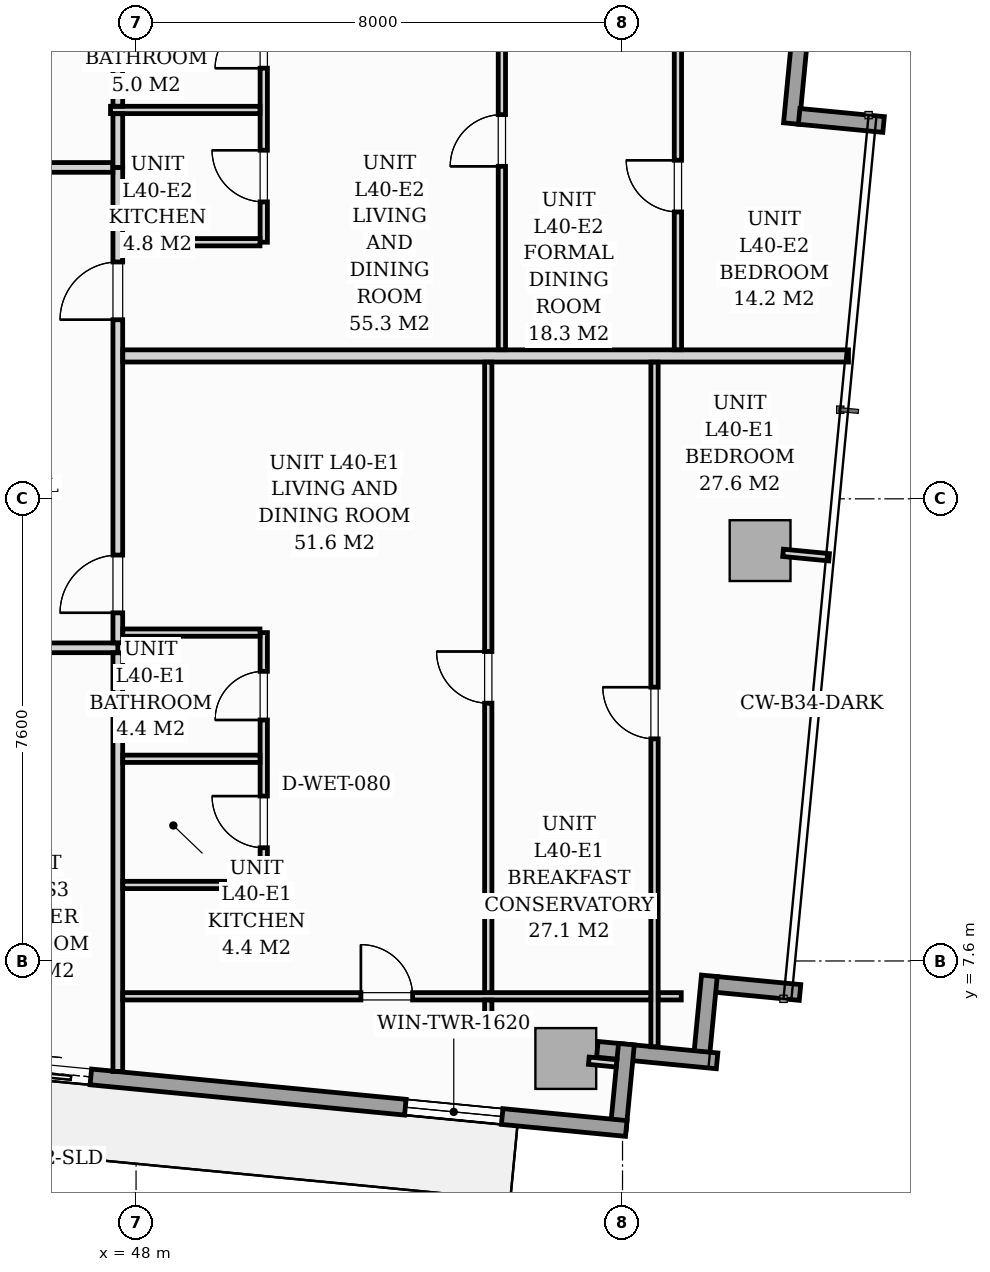
"""IFC4 building model, lengths in metres.
Left out: names, types, materials, properties, quantities, classifications, styles, units other than length and angle.
Written with IfcOpenShell. Run it as: python <this file> out.ifc"""

import sys

from ifc_helpers import new_model, si_unit, direction, frame, frame_2d, origin, origin_2d, place, context, subcontext, project, spatial, rectangle, extrude, source, transform, mapped, element, fill, save


model = new_model("IFC4")
c1 = context("Model", 3, precision=1e-05, world=origin(), true_north=direction((0.0, 1.0)))
c2 = subcontext(c1, "Body", "Model", "MODEL_VIEW")
j1 = project(units=[si_unit("LENGTHUNIT", "METRE"), si_unit("PLANEANGLEUNIT", "RADIAN")], contexts=[c1])
p1 = place(None, origin())
s1 = spatial("IfcSite", under=j1, at=p1, CompositionType="ELEMENT")
p2 = place(p1, origin())
s2 = spatial("IfcBuilding", under=s1, at=p2, CompositionType="ELEMENT")
p3 = place(p2, frame((0.0, 0.0, 140.6)))
s3 = spatial("IfcBuildingStorey", under=s2, at=p3, CompositionType="ELEMENT", Elevation=140.6)
m1 = source(origin(), c2, "Body", "SweptSolid", [
    extrude(rectangle(XDim=1.0, YDim=1.0, at=origin_2d()), origin(), (0.0, 0.0, 1.0), 3.196),
])
for number, where, z_axis, x_axis in (
    (1, (55.067, 5.996, 0.002), (0.0, 0.0, 1.0), (0.995, -0.096, 0.0)),
    (2, (58.262, 14.348, 0.002), (0.0, 0.0, 1.0), (0.995, -0.096, 0.0)),
):
    element("IfcColumn", number, at=place(p3, frame(where, z_axis=z_axis, x_axis=x_axis)), inside=s3, PredefinedType="COLUMN", context=c2, shape_type="MappedRepresentation", body=[
        mapped(m1, transform((0.0, 0.0, 0.0), scale=1.0)),
    ])
for number, where, z_axis, x_axis in (
    (3, (58.912, 22.76, 0.0), (0.0, 0.0, 1.0), (-0.096, -0.995, 0.0)),
    (4, (58.905, 21.49, 0.0), (0.0, 0.0, 1.0), (0.995, -0.096, 0.0)),
):
    element("IfcWall", number, at=place(p3, frame(where, z_axis=z_axis, x_axis=x_axis)), inside=s3, PredefinedType="STANDARD", context=c2, shape_type="SweptSolid", body=[
        extrude(rectangle(XDim=1.395, YDim=0.26, at=frame_2d((0.698, 0.0))), origin(), (0.0, 0.0, 1.0), 2.94),
    ])
for number, where, z_axis, x_axis in (
    (5, (58.919, 7.082, 0.0), (0.0, 0.0, 1.0), (-0.995, 0.096, 0.0)),
    (6, (57.428, 7.356, 0.0), (0.0, 0.0, 1.0), (-0.096, -0.995, 0.0)),
):
    element("IfcWall", number, at=place(p3, frame(where, z_axis=z_axis, x_axis=x_axis)), inside=s3, PredefinedType="STANDARD", context=c2, shape_type="SweptSolid", body=[
        extrude(rectangle(XDim=1.395, YDim=0.26, at=frame_2d((0.697, 0.0))), origin(), (0.0, 0.0, 1.0), 2.94),
    ])
p4 = place(p3, frame((57.555, 5.958, 0.0), z_axis=(0.0, 0.0, 1.0), x_axis=(-0.995401789159, 0.095787672171, 0.0)))
e7 = element("IfcWall", 7, at=p4, inside=s3, PredefinedType="STANDARD", context=c2, shape_type="SweptSolid", body=[
    extrude(rectangle(XDim=1.978, YDim=0.26, at=frame_2d((0.989, 0.0))), origin(), (0.0, 0.0, 1.0), 2.94),
])
p5 = place(p3, frame((56.064, 6.232, 0.0), z_axis=(0.0, 0.0, 1.0), x_axis=(-0.09589913835, -0.995391056452, 0.0)))
e8 = element("IfcWall", 8, at=p5, inside=s3, PredefinedType="STANDARD", context=c2, shape_type="SweptSolid", body=[
    extrude(rectangle(XDim=1.395, YDim=0.26, at=frame_2d((0.698, 0.0))), origin(), (0.0, 0.0, 1.0), 2.94),
])
p6 = place(p3, frame((56.061, 4.845, 0.0), z_axis=(0.0, 0.0, 1.0), x_axis=(-0.995395976631, 0.095848055311, 0.0)))
e9 = element("IfcWall", 9, at=p6, inside=s3, PredefinedType="STANDARD", context=c2, shape_type="SweptSolid", body=[
    extrude(rectangle(XDim=17.01, YDim=0.26, at=frame_2d((8.505, 0.0))), origin(), (0.0, 0.0, 1.0), 2.94),
])
p7 = place(p6, frame((8.846, 0.0, 0.0)))
e10 = element("IfcOpeningElement", 10, at=p7, cuts=e9, PredefinedType="OPENING", context=c2, shape_type="SweptSolid", body=[
    extrude(rectangle(XDim=1.8, YDim=2.06, at=frame_2d((0.9, 1.03))), frame((0.0, 0.14, 0.0), z_axis=(0.0, -1.0, 0.0), x_axis=(1.0, 0.0, 0.0)), (0.0, 0.0, 1.0), 0.28),
])
p8 = place(p6, frame((2.05, 0.0, 0.65)))
e11 = element("IfcOpeningElement", 11, at=p8, cuts=e9, PredefinedType="OPENING", context=c2, shape_type="SweptSolid", body=[
    extrude(rectangle(XDim=1.6, YDim=1.5, at=frame_2d((0.8, 0.75))), frame((0.0, 0.14, 0.0), z_axis=(0.0, -1.0, 0.0), x_axis=(1.0, 0.0, 0.0)), (0.0, 0.0, 1.0), 0.28),
])
p9 = place(p3, frame((22.05, 12.75, 0.0), z_axis=(0.0, 0.0, 1.0), x_axis=(1.0, 0.0, 0.0)))
e12 = element("IfcWall", 12, at=p9, inside=s3, PredefinedType="PARTITIONING", context=c2, shape_type="SweptSolid", body=[
    extrude(rectangle(XDim=25.65, YDim=0.16, at=frame_2d((12.825, 0.0))), origin(), (0.0, 0.0, 1.0), 2.94),
])
p10 = place(p9, frame((1.312, 0.0, 0.0)))
e13 = element("IfcOpeningElement", 13, at=p10, cuts=e12, PredefinedType="OPENING", context=c2, shape_type="SweptSolid", body=[
    extrude(rectangle(XDim=0.95, YDim=2.06, at=frame_2d((0.475, 1.03))), frame((0.0, 0.09, 0.0), z_axis=(0.0, -1.0, 0.0), x_axis=(1.0, 0.0, 0.0)), (0.0, 0.0, 1.0), 0.18),
])
p11 = place(p9, frame((8.281, 0.0, 0.0)))
e14 = element("IfcOpeningElement", 14, at=p11, cuts=e12, PredefinedType="OPENING", context=c2, shape_type="SweptSolid", body=[
    extrude(rectangle(XDim=0.95, YDim=2.06, at=frame_2d((0.475, 1.03))), frame((0.0, 0.09, 0.0), z_axis=(0.0, -1.0, 0.0), x_axis=(1.0, 0.0, 0.0)), (0.0, 0.0, 1.0), 0.18),
])
p12 = place(p9, frame((17.268, 0.0, 0.0)))
e15 = element("IfcOpeningElement", 15, at=p12, cuts=e12, PredefinedType="OPENING", context=c2, shape_type="SweptSolid", body=[
    extrude(rectangle(XDim=0.95, YDim=2.06, at=frame_2d((0.475, 1.03))), frame((0.0, 0.09, 0.0), z_axis=(0.0, -1.0, 0.0), x_axis=(1.0, 0.0, 0.0)), (0.0, 0.0, 1.0), 0.18),
])
p13 = place(p3, frame((47.7, 5.783, 0.0), z_axis=(0.0, 0.0, 1.0), x_axis=(0.0, 1.0, 0.0)))
e16 = element("IfcWall", 16, at=p13, inside=s3, PredefinedType="PARTITIONING", context=c2, shape_type="SweptSolid", body=[
    extrude(rectangle(XDim=6.885, YDim=0.16, at=frame_2d((3.442, 0.0))), origin(), (0.0, 0.0, 1.0), 2.94),
])
p14 = place(p3, frame((47.7, 12.832, 0.0), z_axis=(0.0, 0.0, 1.0), x_axis=(0.0, 1.0, 0.0)))
e17 = element("IfcWall", 17, at=p14, inside=s3, PredefinedType="PARTITIONING", context=c2, shape_type="SweptSolid", body=[
    extrude(rectangle(XDim=7.818, YDim=0.16, at=frame_2d((3.909, 0.0))), origin(), (0.0, 0.0, 1.0), 2.94),
])
p15 = place(p14, frame((0.493, 0.0, 0.0)))
e18 = element("IfcOpeningElement", 18, at=p15, cuts=e17, PredefinedType="OPENING", context=c2, shape_type="SweptSolid", body=[
    extrude(rectangle(XDim=0.95, YDim=2.06, at=frame_2d((0.475, 1.03))), frame((0.0, 0.09, 0.0), z_axis=(0.0, -1.0, 0.0), x_axis=(1.0, 0.0, 0.0)), (0.0, 0.0, 1.0), 0.18),
])
p16 = place(p14, frame((5.313, 0.0, 0.0)))
e19 = element("IfcOpeningElement", 19, at=p16, cuts=e17, PredefinedType="OPENING", context=c2, shape_type="SweptSolid", body=[
    extrude(rectangle(XDim=0.95, YDim=2.06, at=frame_2d((0.475, 1.03))), frame((0.0, 0.09, 0.0), z_axis=(0.0, -1.0, 0.0), x_axis=(1.0, 0.0, 0.0)), (0.0, 0.0, 1.0), 0.18),
])
p17 = place(p3, frame((45.902, 20.65, 0.0), z_axis=(0.0, 0.0, 1.0), x_axis=(1.0, 0.0, 0.0)))
e20 = element("IfcWall", 20, at=p17, inside=s3, PredefinedType="PARTITIONING", context=c2, shape_type="SweptSolid", body=[
    extrude(rectangle(XDim=1.716, YDim=0.16, at=frame_2d((0.858, 0.0))), origin(), (0.0, 0.0, 1.0), 2.94),
])
p18 = place(p3, frame((47.782, 17.55, 0.0), z_axis=(0.0, 0.0, 1.0), x_axis=(1.0, 0.0, 0.0)))
e21 = element("IfcWall", 21, at=p18, inside=s3, PredefinedType="PARTITIONING", context=c2, shape_type="SweptSolid", body=[
    extrude(rectangle(XDim=11.934, YDim=0.2, at=frame_2d((5.967, 0.0))), origin(), (0.0, 0.0, 1.0), 2.94),
])
p19 = place(p3, frame((50.1, 8.85, 0.0), z_axis=(0.0, 0.0, 1.0), x_axis=(0.0, 1.0, 0.0)))
e22 = element("IfcWall", 22, at=p19, inside=s3, PredefinedType="PARTITIONING", context=c2, shape_type="SweptSolid", body=[
    extrude(rectangle(XDim=4.15, YDim=0.12, at=frame_2d((2.075, 0.0))), origin(), (0.0, 0.0, 1.0), 2.94),
])
p20 = place(p19, frame((0.612, 0.0, 0.0)))
e23 = element("IfcOpeningElement", 23, at=p20, cuts=e22, PredefinedType="OPENING", context=c2, shape_type="SweptSolid", body=[
    extrude(rectangle(XDim=0.85, YDim=2.05, at=frame_2d((0.425, 1.025))), frame((0.0, 0.07, 0.0), z_axis=(0.0, -1.0, 0.0), x_axis=(1.0, 0.0, 0.0)), (0.0, 0.0, 1.0), 0.14),
])
p21 = place(p19, frame((2.713, 0.0, 0.0)))
e24 = element("IfcOpeningElement", 24, at=p21, cuts=e22, PredefinedType="OPENING", context=c2, shape_type="SweptSolid", body=[
    extrude(rectangle(XDim=0.8, YDim=2.02, at=frame_2d((0.4, 1.01))), frame((0.0, 0.07, 0.0), z_axis=(0.0, -1.0, 0.0), x_axis=(1.0, 0.0, 0.0)), (0.0, 0.0, 1.0), 0.14),
])
for number, where, z_axis, x_axis in (
    (25, (47.782, 10.925, 0.0), (0.0, 0.0, 1.0), (1.0, 0.0, 0.0)),
    (26, (47.782, 8.85, 0.0), (0.0, 0.0, 1.0), (1.0, 0.0, 0.0)),
    (27, (47.782, 13.0, 0.0), (0.0, 0.0, 1.0), (1.0, 0.0, 0.0)),
):
    element("IfcWall", number, at=place(p3, frame(where, z_axis=z_axis, x_axis=x_axis)), inside=s3, PredefinedType="PARTITIONING", context=c2, shape_type="SweptSolid", body=[
        extrude(rectangle(XDim=2.256, YDim=0.12, at=frame_2d((1.128, 0.0))), origin(), (0.0, 0.0, 1.0), 2.94),
    ])
p22 = place(p3, frame((56.526, 6.189, 0.0), z_axis=(0.0, 0.0, 1.0), x_axis=(0.0, 1.0, 0.0)))
e28 = element("IfcWall", 28, at=p22, inside=s3, PredefinedType="PARTITIONING", context=c2, shape_type="SweptSolid", body=[
    extrude(rectangle(XDim=11.259, YDim=0.12, at=frame_2d((5.629, 0.0))), origin(), (0.0, 0.0, 1.0), 2.94),
])
p23 = place(p22, frame((5.064, 0.0, 0.0)))
e29 = element("IfcOpeningElement", 29, at=p23, cuts=e28, PredefinedType="OPENING", context=c2, shape_type="SweptSolid", body=[
    extrude(rectangle(XDim=0.85, YDim=2.05, at=frame_2d((0.425, 1.025))), frame((0.0, 0.07, 0.0), z_axis=(0.0, -1.0, 0.0), x_axis=(1.0, 0.0, 0.0)), (0.0, 0.0, 1.0), 0.14),
])
p24 = place(p3, frame((47.782, 7.019, 0.0), z_axis=(0.0, 0.0, 1.0), x_axis=(1.0, 0.0, 0.0)))
e30 = element("IfcWall", 30, at=p24, inside=s3, PredefinedType="PARTITIONING", context=c2, shape_type="SweptSolid", body=[
    extrude(rectangle(XDim=8.682, YDim=0.12, at=frame_2d((4.341, 0.0))), origin(), (0.0, 0.0, 1.0), 2.94),
])
p25 = place(p24, frame((3.916, 0.0, 0.0)))
e31 = element("IfcOpeningElement", 31, at=p25, cuts=e30, PredefinedType="OPENING", context=c2, shape_type="SweptSolid", body=[
    extrude(rectangle(XDim=0.85, YDim=2.05, at=frame_2d((0.425, 1.025))), frame((0.0, 0.07, 0.0), z_axis=(0.0, -1.0, 0.0), x_axis=(1.0, 0.0, 0.0)), (0.0, 0.0, 1.0), 0.14),
])
p26 = place(p3, frame((56.588, 7.019, 0.0), z_axis=(0.0, 0.0, 1.0), x_axis=(1.0, 0.0, 0.0)))
e32 = element("IfcWall", 32, at=p26, inside=s3, PredefinedType="PARTITIONING", context=c2, shape_type="SweptSolid", body=[
    extrude(rectangle(XDim=0.378, YDim=0.12, at=frame_2d((0.189, 0.0))), origin(), (0.0, 0.0, 1.0), 2.94),
])
p27 = place(p3, frame((53.792, 6.579, 0.0), z_axis=(0.0, 0.0, 1.0), x_axis=(0.0, 1.0, 0.0)))
e33 = element("IfcWall", 33, at=p27, inside=s3, PredefinedType="PARTITIONING", context=c2, shape_type="SweptSolid", body=[
    extrude(rectangle(XDim=0.378, YDim=0.12, at=frame_2d((0.189, 0.0))), origin(), (0.0, 0.0, 1.0), 2.94),
])
p28 = place(p3, frame((53.792, 7.081, 0.0), z_axis=(0.0, 0.0, 1.0), x_axis=(0.0, 1.0, 0.0)))
e34 = element("IfcWall", 34, at=p28, inside=s3, PredefinedType="PARTITIONING", context=c2, shape_type="SweptSolid", body=[
    extrude(rectangle(XDim=10.367, YDim=0.12, at=frame_2d((5.184, 0.0))), origin(), (0.0, 0.0, 1.0), 2.94),
])
p29 = place(p28, frame((4.758, 0.0, 0.0)))
e35 = element("IfcOpeningElement", 35, at=p29, cuts=e34, PredefinedType="OPENING", context=c2, shape_type="SweptSolid", body=[
    extrude(rectangle(XDim=0.85, YDim=2.05, at=frame_2d((0.425, 1.025))), frame((0.0, 0.07, 0.0), z_axis=(0.0, -1.0, 0.0), x_axis=(1.0, 0.0, 0.0)), (0.0, 0.0, 1.0), 0.14),
])
p30 = place(p3, frame((50.1, 19.42, 0.0), z_axis=(0.0, 0.0, 1.0), x_axis=(0.0, 1.0, 0.0)))
e36 = element("IfcWall", 36, at=p30, inside=s3, PredefinedType="PARTITIONING", context=c2, shape_type="SweptSolid", body=[
    extrude(rectangle(XDim=4.35, YDim=0.12, at=frame_2d((2.175, 0.0))), origin(), (0.0, 0.0, 1.0), 2.94),
])
p31 = place(p30, frame((0.663, 0.0, 0.0)))
e37 = element("IfcOpeningElement", 37, at=p31, cuts=e36, PredefinedType="OPENING", context=c2, shape_type="SweptSolid", body=[
    extrude(rectangle(XDim=0.85, YDim=2.05, at=frame_2d((0.425, 1.025))), frame((0.0, 0.07, 0.0), z_axis=(0.0, -1.0, 0.0), x_axis=(1.0, 0.0, 0.0)), (0.0, 0.0, 1.0), 0.14),
])
p32 = place(p30, frame((2.862, 0.0, 0.0)))
e38 = element("IfcOpeningElement", 38, at=p32, cuts=e36, PredefinedType="OPENING", context=c2, shape_type="SweptSolid", body=[
    extrude(rectangle(XDim=0.8, YDim=2.02, at=frame_2d((0.4, 1.01))), frame((0.0, 0.07, 0.0), z_axis=(0.0, -1.0, 0.0), x_axis=(1.0, 0.0, 0.0)), (0.0, 0.0, 1.0), 0.14),
])
p33 = place(p3, frame((47.58, 21.595, 0.0), z_axis=(0.0, 0.0, 1.0), x_axis=(1.0, 0.0, 0.0)))
e39 = element("IfcWall", 39, at=p33, inside=s3, PredefinedType="PARTITIONING", context=c2, shape_type="SweptSolid", body=[
    extrude(rectangle(XDim=2.458, YDim=0.12, at=frame_2d((1.229, 0.0))), origin(), (0.0, 0.0, 1.0), 2.94),
])
p34 = place(p3, frame((47.782, 19.42, 0.0), z_axis=(0.0, 0.0, 1.0), x_axis=(1.0, 0.0, 0.0)))
e40 = element("IfcWall", 40, at=p34, inside=s3, PredefinedType="PARTITIONING", context=c2, shape_type="SweptSolid", body=[
    extrude(rectangle(XDim=2.256, YDim=0.12, at=frame_2d((1.128, 0.0))), origin(), (0.0, 0.0, 1.0), 2.94),
])
p35 = place(p3, frame((47.7, 20.65, 0.0), z_axis=(0.0, 0.0, 1.0), x_axis=(0.0, 1.0, 0.0)))
e41 = element("IfcWall", 41, at=p35, inside=s3, PredefinedType="PARTITIONING", context=c2, shape_type="SweptSolid", body=[
    extrude(rectangle(XDim=0.883, YDim=0.16, at=frame_2d((0.441, 0.0))), origin(), (0.0, 0.0, 1.0), 2.94),
])
p36 = place(p3, frame((47.7, 21.657, 0.0), z_axis=(0.0, 0.0, 1.0), x_axis=(0.0, 1.0, 0.0)))
e42 = element("IfcWall", 42, at=p36, inside=s3, PredefinedType="PARTITIONING", context=c2, shape_type="SweptSolid", body=[
    extrude(rectangle(XDim=2.051, YDim=0.16, at=frame_2d((1.025, 0.0))), origin(), (0.0, 0.0, 1.0), 2.94),
])
p37 = place(p3, frame((56.911, 17.652, 0.0), z_axis=(0.0, 0.0, 1.0), x_axis=(0.0, 1.0, 0.0)))
e43 = element("IfcWall", 43, at=p37, inside=s3, PredefinedType="PARTITIONING", context=c2, shape_type="SweptSolid", body=[
    extrude(rectangle(XDim=6.408, YDim=0.12, at=frame_2d((3.204, 0.0))), origin(), (0.0, 0.0, 1.0), 2.382),
])
p38 = place(p37, frame((2.266, 0.0, 0.0)))
e44 = element("IfcOpeningElement", 44, at=p38, cuts=e43, PredefinedType="OPENING", context=c2, shape_type="SweptSolid", body=[
    extrude(rectangle(XDim=0.85, YDim=2.05, at=frame_2d((0.425, 1.025))), frame((0.0, 0.07, 0.0), z_axis=(0.0, -1.0, 0.0), x_axis=(1.0, 0.0, 0.0)), (0.0, 0.0, 1.0), 0.14),
])
p39 = place(p3, frame((54.016, 17.652, 0.0), z_axis=(0.0, 0.0, 1.0), x_axis=(0.0, 1.0, 0.0)))
e45 = element("IfcWall", 45, at=p39, inside=s3, PredefinedType="PARTITIONING", context=c2, shape_type="SweptSolid", body=[
    extrude(rectangle(XDim=6.687, YDim=0.12, at=frame_2d((3.344, 0.0))), origin(), (0.0, 0.0, 1.0), 2.94),
])
p40 = place(p39, frame((3.016, 0.0, 0.0)))
e46 = element("IfcOpeningElement", 46, at=p40, cuts=e45, PredefinedType="OPENING", context=c2, shape_type="SweptSolid", body=[
    extrude(rectangle(XDim=0.85, YDim=2.05, at=frame_2d((0.425, 1.025))), frame((0.0, 0.07, 0.0), z_axis=(0.0, -1.0, 0.0), x_axis=(1.0, 0.0, 0.0)), (0.0, 0.0, 1.0), 0.14),
])
p41 = place(p3, frame((55.445, 5.96, 0.0), z_axis=(0.0, 0.0, 1.0), x_axis=(0.995384576284, -0.09596637586, 0.0)))
e47 = element("IfcWall", 47, at=p41, inside=s3, PredefinedType="PARTITIONING", context=c2, shape_type="SweptSolid", body=[
    extrude(rectangle(XDim=0.458, YDim=0.12, at=frame_2d((0.229, 0.0))), origin(), (0.0, 0.0, 1.0), 2.94),
])
p42 = place(p3, frame((58.64, 14.312, 0.0), z_axis=(0.0, 0.0, 1.0), x_axis=(0.995377786728, -0.096036772582, 0.0)))
e48 = element("IfcWall", 48, at=p42, inside=s3, PredefinedType="PARTITIONING", context=c2, shape_type="SweptSolid", body=[
    extrude(rectangle(XDim=0.76, YDim=0.12, at=frame_2d((0.38, 0.0))), origin(), (0.0, 0.0, 1.0), 2.94),
])
m2 = source(origin(), c2, "Body", "SweptSolid", [
    extrude(rectangle(XDim=1.8, YDim=2.06, at=frame_2d((0.9, 1.03))), frame((0.0, 0.025, 0.0), z_axis=(0.0, -1.0, 0.0), x_axis=(1.0, 0.0, 0.0)), (0.0, 0.0, 1.0), 0.05),
])
p43 = place(p7, origin())
e49 = element("IfcDoor", 49, at=p43, inside=s3, OperationType="SLIDING_TO_RIGHT", PredefinedType="DOOR", context=c2, shape_type="MappedRepresentation", body=[
    mapped(m2, transform((0.0, 0.0, 0.0), scale=1.0)),
])
fill(e10, e49)
m3 = source(origin(), c2, "Body", "SweptSolid", [
    extrude(rectangle(XDim=1.6, YDim=1.5, at=frame_2d((0.8, 0.75))), frame((0.0, 0.03, 0.0), z_axis=(0.0, -1.0, 0.0), x_axis=(1.0, 0.0, 0.0)), (0.0, 0.0, 1.0), 0.06),
])
p44 = place(p8, origin())
e50 = element("IfcWindow", 50, at=p44, inside=s3, PartitioningType="SINGLE_PANEL", PredefinedType="WINDOW", context=c2, shape_type="MappedRepresentation", body=[
    mapped(m3, transform((0.0, 0.0, 0.0), scale=1.0)),
])
fill(e11, e50)
m4 = source(origin(), c2, "Body", "SweptSolid", [
    extrude(rectangle(XDim=0.95, YDim=2.06, at=frame_2d((0.475, 1.03))), frame((0.0, 0.025, 0.0), z_axis=(0.0, -1.0, 0.0), x_axis=(1.0, 0.0, 0.0)), (0.0, 0.0, 1.0), 0.05),
])
p45 = place(p15, origin())
e51 = element("IfcDoor", 51, at=p45, inside=s3, OperationType="SINGLE_SWING_LEFT", PredefinedType="DOOR", context=c2, shape_type="MappedRepresentation", body=[
    mapped(m4, transform((0.0, 0.0, 0.0), scale=1.0)),
])
fill(e18, e51)
m5 = source(origin(), c2, "Body", "SweptSolid", [
    extrude(rectangle(XDim=0.85, YDim=2.05, at=frame_2d((0.425, 1.025))), frame((0.0, 0.025, 0.0), z_axis=(0.0, -1.0, 0.0), x_axis=(1.0, 0.0, 0.0)), (0.0, 0.0, 1.0), 0.05),
])
p46 = place(p20, origin())
e52 = element("IfcDoor", 52, at=p46, inside=s3, OperationType="SINGLE_SWING_RIGHT", PredefinedType="DOOR", context=c2, shape_type="MappedRepresentation", body=[
    mapped(m5, transform((0.0, 0.0, 0.0), scale=1.0)),
])
fill(e23, e52)
m6 = source(origin(), c2, "Body", "SweptSolid", [
    extrude(rectangle(XDim=0.8, YDim=2.02, at=frame_2d((0.4, 1.01))), frame((0.0, 0.025, 0.0), z_axis=(0.0, -1.0, 0.0), x_axis=(1.0, 0.0, 0.0)), (0.0, 0.0, 1.0), 0.05),
])
p47 = place(p21, origin())
e53 = element("IfcDoor", 53, at=p47, inside=s3, OperationType="SINGLE_SWING_LEFT", PredefinedType="DOOR", context=c2, shape_type="MappedRepresentation", body=[
    mapped(m6, transform((0.0, 0.0, 0.0), scale=1.0)),
])
fill(e24, e53)
p48 = place(p23, origin())
e54 = element("IfcDoor", 54, at=p48, inside=s3, OperationType="SINGLE_SWING_RIGHT", PredefinedType="DOOR", context=c2, shape_type="MappedRepresentation", body=[
    mapped(m5, transform((0.0, 0.0, 0.0), scale=1.0)),
])
fill(e29, e54)
p49 = place(p25, origin())
e55 = element("IfcDoor", 55, at=p49, inside=s3, OperationType="SINGLE_SWING_LEFT", PredefinedType="DOOR", context=c2, shape_type="MappedRepresentation", body=[
    mapped(m5, transform((0.0, 0.0, 0.0), scale=1.0)),
])
fill(e31, e55)
p50 = place(p29, origin())
e56 = element("IfcDoor", 56, at=p50, inside=s3, OperationType="SINGLE_SWING_RIGHT", PredefinedType="DOOR", context=c2, shape_type="MappedRepresentation", body=[
    mapped(m5, transform((0.0, 0.0, 0.0), scale=1.0)),
])
fill(e35, e56)
p51 = place(p16, origin())
e57 = element("IfcDoor", 57, at=p51, inside=s3, OperationType="SINGLE_SWING_LEFT", PredefinedType="DOOR", context=c2, shape_type="MappedRepresentation", body=[
    mapped(m4, transform((0.0, 0.0, 0.0), scale=1.0)),
])
fill(e19, e57)
p52 = place(p31, origin())
e58 = element("IfcDoor", 58, at=p52, inside=s3, OperationType="SINGLE_SWING_RIGHT", PredefinedType="DOOR", context=c2, shape_type="MappedRepresentation", body=[
    mapped(m5, transform((0.0, 0.0, 0.0), scale=1.0)),
])
fill(e37, e58)
p53 = place(p32, origin())
e59 = element("IfcDoor", 59, at=p53, inside=s3, OperationType="SINGLE_SWING_LEFT", PredefinedType="DOOR", context=c2, shape_type="MappedRepresentation", body=[
    mapped(m6, transform((0.0, 0.0, 0.0), scale=1.0)),
])
fill(e38, e59)
p54 = place(p38, origin())
e60 = element("IfcDoor", 60, at=p54, inside=s3, OperationType="SINGLE_SWING_RIGHT", PredefinedType="DOOR", context=c2, shape_type="MappedRepresentation", body=[
    mapped(m5, transform((0.0, 0.0, 0.0), scale=1.0)),
])
fill(e44, e60)
p55 = place(p40, origin())
e61 = element("IfcDoor", 61, at=p55, inside=s3, OperationType="SINGLE_SWING_LEFT", PredefinedType="DOOR", context=c2, shape_type="MappedRepresentation", body=[
    mapped(m5, transform((0.0, 0.0, 0.0), scale=1.0)),
])
fill(e46, e61)
save(model, sys.argv[1])
